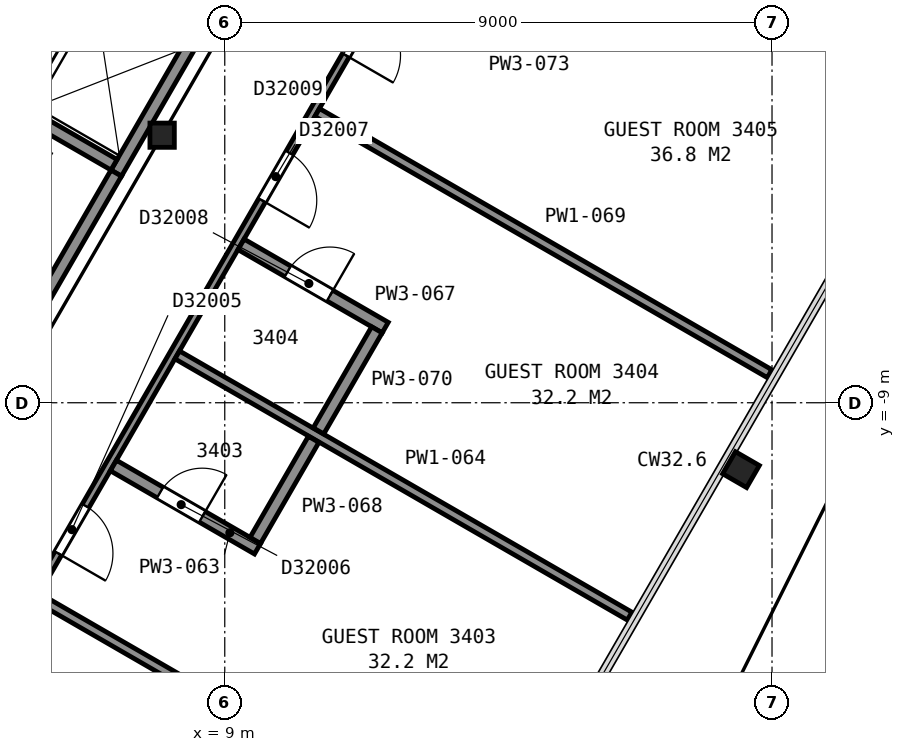
"""IFC4 building model, lengths in metres.
Left out: names, types, materials, properties, quantities, classifications, styles, units other than length and angle.
Written with IfcOpenShell. Run it as: python <this file> out.ifc"""

import sys

from ifc_helpers import new_model, si_unit, direction, frame, frame_2d, origin, origin_2d, place, context, subcontext, project, spatial, rectangle, i_section, extrude, element, fill, save


model = new_model("IFC4")
c1 = context("Model", 3, precision=1e-05, world=origin(), true_north=direction((0.0, 1.0)))
c2 = subcontext(c1, "Body", "Model", "MODEL_VIEW")
j1 = project(units=[si_unit("LENGTHUNIT", "METRE"), si_unit("PLANEANGLEUNIT", "RADIAN")], contexts=[c1])
p1 = place(None, origin())
s1 = spatial("IfcSite", under=j1, at=p1, CompositionType="ELEMENT")
p2 = place(p1, origin())
s2 = spatial("IfcBuilding", under=s1, at=p2, CompositionType="ELEMENT")
p3 = place(p2, frame((0.0, 0.0, 139.6)))
s3 = spatial("IfcBuildingStorey", under=s2, at=p3, CompositionType="ELEMENT", Elevation=139.6)
p4 = place(p3, frame((17.49, -10.1, 0.0), z_axis=(0.0, 0.0, 1.0), x_axis=(-0.5, -0.866025403784, 0.0)))
e1 = element("IfcColumn", 1, at=p4, inside=s3, PredefinedType="COLUMN", context=c2, shape_type="SweptSolid", body=[
    extrude(i_section(OverallWidth=0.419, OverallDepth=0.455, WebThickness=0.042, FlangeThickness=0.068, FilletRadius=0.015, at=origin_2d()), origin(), (0.0, 0.0, 1.0), 2.87),
])
p5 = place(p3, frame((7.97, -4.6, 0.0), z_axis=(0.0, 0.0, 1.0), x_axis=(1.0, 0.0, 0.0)))
e2 = element("IfcColumn", 2, at=p5, inside=s3, PredefinedType="COLUMN", context=c2, shape_type="SweptSolid", body=[
    extrude(i_section(OverallWidth=0.401, OverallDepth=0.399, WebThickness=0.025, FlangeThickness=0.04, FilletRadius=0.015, at=origin_2d()), origin(), (0.0, 0.0, 1.0), 3.56),
])
p6 = place(p3, frame((7.216, -5.222, 0.0), z_axis=(0.0, 0.0, 1.0), x_axis=(0.499990435942, 0.866030925526, 0.0)))
e3 = element("IfcWall", 3, at=p6, inside=s3, PredefinedType="PARTITIONING", context=c2, shape_type="SweptSolid", body=[
    extrude(rectangle(XDim=2.55, YDim=0.2, at=frame_2d((1.275, 0.0))), origin(), (0.0, 0.0, 1.0), 3.6),
])
p7 = place(p3, frame((5.527, -4.247, 0.0), z_axis=(0.0, 0.0, 1.0), x_axis=(0.499938297808, 0.866061024631, 0.0)))
e4 = element("IfcWall", 4, at=p7, inside=s3, PredefinedType="PARTITIONING", context=c2, shape_type="SweptSolid", body=[
    extrude(rectangle(XDim=2.35, YDim=0.2, at=frame_2d((1.175, 0.0))), origin(), (0.0, 0.0, 1.0), 3.6),
])
p8 = place(p7, frame((0.725, 0.0, 0.0)))
e5 = element("IfcOpeningElement", 5, at=p8, cuts=e4, PredefinedType="OPENING", context=c2, shape_type="SweptSolid", body=[
    extrude(rectangle(XDim=1.1, YDim=2.1, at=frame_2d((0.55, 1.05))), frame((0.0, 0.11, 0.0), z_axis=(0.0, -1.0, 0.0), x_axis=(1.0, 0.0, 0.0)), (0.0, 0.0, 1.0), 0.22),
])
p9 = place(p3, frame((7.179, -5.086, 0.0), z_axis=(0.0, 0.0, 1.0), x_axis=(-0.866036909293, 0.499980071345, 0.0)))
e6 = element("IfcWall", 6, at=p9, inside=s3, PredefinedType="PARTITIONING", context=c2, shape_type="SweptSolid", body=[
    extrude(rectangle(XDim=1.75, YDim=0.2, at=frame_2d((0.875, 0.0))), origin(), (0.0, 0.0, 1.0), 3.6),
])
p10 = place(p3, frame((5.906, -7.49, 0.0), z_axis=(0.0, 0.0, 1.0), x_axis=(0.500252727967, 0.865879442048, 0.0)))
e7 = element("IfcWall", 7, at=p10, inside=s3, PredefinedType="PARTITIONING", context=c2, shape_type="SweptSolid", body=[
    extrude(rectangle(XDim=2.617, YDim=0.2, at=frame_2d((1.309, 0.0))), origin(), (0.0, 0.0, 1.0), 3.35),
])
p11 = place(p3, frame((15.962, 5.326, 0.0), z_axis=(0.0, 0.0, 1.0), x_axis=(-0.499992829944, -0.866029543379, 0.0)))
e8 = element("IfcWall", 8, at=p11, inside=s3, PredefinedType="PARTITIONING", context=c2, shape_type="SweptSolid", body=[
    extrude(rectangle(XDim=24.413, YDim=0.125, at=frame_2d((12.207, 0.0))), origin(), (0.0, 0.0, 1.0), 2.262),
])
p12 = place(p11, frame((21.258, 0.0, 0.0)))
e9 = element("IfcOpeningElement", 9, at=p12, cuts=e8, PredefinedType="OPENING", context=c2, shape_type="SweptSolid", body=[
    extrude(rectangle(XDim=0.9, YDim=2.1, at=frame_2d((0.45, 1.05))), frame((0.0, 0.073, 0.0), z_axis=(0.0, -1.0, 0.0), x_axis=(1.0, 0.0, 0.0)), (0.0, 0.0, 1.0), 0.145),
])
p13 = place(p11, frame((18.502, 0.0, 0.0)))
e10 = element("IfcOpeningElement", 10, at=p13, cuts=e8, PredefinedType="OPENING", context=c2, shape_type="SweptSolid", body=[
    extrude(rectangle(XDim=0.9, YDim=2.1, at=frame_2d((0.45, 1.05))), frame((0.0, 0.073, 0.0), z_axis=(0.0, -1.0, 0.0), x_axis=(1.0, 0.0, 0.0)), (0.0, 0.0, 1.0), 0.145),
])
p14 = place(p11, frame((11.799, 0.0, 0.0)))
e11 = element("IfcOpeningElement", 11, at=p14, cuts=e8, PredefinedType="OPENING", context=c2, shape_type="SweptSolid", body=[
    extrude(rectangle(XDim=0.9, YDim=2.1, at=frame_2d((0.45, 1.05))), frame((0.0, 0.073, 0.0), z_axis=(0.0, -1.0, 0.0), x_axis=(1.0, 0.0, 0.0)), (0.0, 0.0, 1.0), 0.145),
])
p15 = place(p11, frame((9.043, 0.0, 0.0)))
e12 = element("IfcOpeningElement", 12, at=p15, cuts=e8, PredefinedType="OPENING", context=c2, shape_type="SweptSolid", body=[
    extrude(rectangle(XDim=0.9, YDim=2.1, at=frame_2d((0.45, 1.05))), frame((0.0, 0.073, 0.0), z_axis=(0.0, -1.0, 0.0), x_axis=(1.0, 0.0, 0.0)), (0.0, 0.0, 1.0), 0.145),
])
p16 = place(p11, frame((1.99, 0.0, 0.0)))
e13 = element("IfcOpeningElement", 13, at=p16, cuts=e8, PredefinedType="OPENING", context=c2, shape_type="SweptSolid", body=[
    extrude(rectangle(XDim=0.9, YDim=2.1, at=frame_2d((0.45, 1.05))), frame((0.0, 0.073, 0.0), z_axis=(0.0, -1.0, 0.0), x_axis=(1.0, 0.0, 0.0)), (0.0, 0.0, 1.0), 0.145),
])
p17 = place(p3, frame((5.916, -12.201, 0.0), z_axis=(0.0, 0.0, 1.0), x_axis=(0.865995804368, -0.50005126419, 0.0)))
e14 = element("IfcWall", 14, at=p17, inside=s3, PredefinedType="PARTITIONING", context=c2, shape_type="SweptSolid", body=[
    extrude(rectangle(XDim=8.591, YDim=0.15, at=frame_2d((4.295, 0.0))), origin(), (0.0, 0.0, 1.0), 2.262),
])
p18 = place(p3, frame((7.168, -10.032, 0.0), z_axis=(0.0, 0.0, 1.0), x_axis=(0.86596722502, -0.50010075504, 0.0)))
e15 = element("IfcWall", 15, at=p18, inside=s3, PredefinedType="PARTITIONING", context=c2, shape_type="SweptSolid", body=[
    extrude(rectangle(XDim=2.737, YDim=0.2, at=frame_2d((1.369, 0.0))), origin(), (0.0, 0.0, 1.0), 2.262),
])
p19 = place(p18, frame((0.887, 0.0, 0.0)))
e16 = element("IfcOpeningElement", 16, at=p19, cuts=e15, PredefinedType="OPENING", context=c2, shape_type="SweptSolid", body=[
    extrude(rectangle(XDim=0.8, YDim=2.1, at=frame_2d((0.4, 1.05))), frame((0.0, 0.11, 0.0), z_axis=(0.0, -1.0, 0.0), x_axis=(1.0, 0.0, 0.0)), (0.0, 0.0, 1.0), 0.22),
])
p20 = place(p3, frame((8.218, -8.213, 0.0), z_axis=(0.0, 0.0, 1.0), x_axis=(0.865997709989, -0.500047963993, 0.0)))
e17 = element("IfcWall", 17, at=p20, inside=s3, PredefinedType="PARTITIONING", context=c2, shape_type="SweptSolid", body=[
    extrude(rectangle(XDim=8.592, YDim=0.15, at=frame_2d((4.296, 0.0))), origin(), (0.0, 0.0, 1.0), 2.262),
])
p21 = place(p3, frame((11.639, -7.764, 0.0), z_axis=(0.0, 0.0, 1.0), x_axis=(-0.866028150195, 0.499995243048, 0.0)))
e18 = element("IfcWall", 18, at=p21, inside=s3, PredefinedType="PARTITIONING", context=c2, shape_type="SweptSolid", body=[
    extrude(rectangle(XDim=2.737, YDim=0.2, at=frame_2d((1.369, 0.0))), origin(), (0.0, 0.0, 1.0), 2.262),
])
p22 = place(p21, frame((1.05, 0.0, 0.0)))
e19 = element("IfcOpeningElement", 19, at=p22, cuts=e18, PredefinedType="OPENING", context=c2, shape_type="SweptSolid", body=[
    extrude(rectangle(XDim=0.8, YDim=2.1, at=frame_2d((0.4, 1.05))), frame((0.0, 0.11, 0.0), z_axis=(0.0, -1.0, 0.0), x_axis=(1.0, 0.0, 0.0)), (0.0, 0.0, 1.0), 0.22),
])
p23 = place(p3, frame((9.502, -11.264, 0.0), z_axis=(0.0, 0.0, 1.0), x_axis=(0.499887618105, 0.86609027778, 0.0)))
e20 = element("IfcWall", 20, at=p23, inside=s3, PredefinedType="PARTITIONING", context=c2, shape_type="SweptSolid", body=[
    extrude(rectangle(XDim=1.919, YDim=0.2, at=frame_2d((0.96, 0.0))), origin(), (0.0, 0.0, 1.0), 2.262),
])
p24 = place(p3, frame((10.52, -4.226, 0.0), z_axis=(0.0, 0.0, 1.0), x_axis=(0.866002910178, -0.500038958046, 0.0)))
e21 = element("IfcWall", 21, at=p24, inside=s3, PredefinedType="PARTITIONING", context=c2, shape_type="SweptSolid", body=[
    extrude(rectangle(XDim=8.591, YDim=0.15, at=frame_2d((4.295, 0.0))), origin(), (0.0, 0.0, 1.0), 2.262),
])
p25 = place(p3, frame((10.542, -9.463, 0.0), z_axis=(0.0, 0.0, 1.0), x_axis=(0.500214044309, 0.865901789971, 0.0)))
e22 = element("IfcWall", 22, at=p25, inside=s3, PredefinedType="PARTITIONING", context=c2, shape_type="SweptSolid", body=[
    extrude(rectangle(XDim=1.92, YDim=0.2, at=frame_2d((0.96, 0.0))), origin(), (0.0, 0.0, 1.0), 2.262),
])
p26 = place(p3, frame((13.122, 0.281, 0.0), z_axis=(0.0, 0.0, 1.0), x_axis=(0.866029425019, -0.499993034952, 0.0)))
e23 = element("IfcWall", 23, at=p26, inside=s3, PredefinedType="PARTITIONING", context=c2, shape_type="SweptSolid", body=[
    extrude(rectangle(XDim=8.591, YDim=0.15, at=frame_2d((4.296, 0.0))), origin(), (0.0, 0.0, 1.0), 2.262),
])
p27 = place(p8, origin())
e24 = element("IfcDoor", 24, at=p27, inside=s3, OperationType="SLIDING_TO_LEFT", PredefinedType="DOOR", context=c2, shape_type="SweptSolid", body=[
    extrude(rectangle(XDim=1.1, YDim=2.1, at=frame_2d((0.55, 1.05))), frame((0.0, 0.025, 0.0), z_axis=(0.0, -1.0, 0.0), x_axis=(1.0, 0.0, 0.0)), (0.0, 0.0, 1.0), 0.05),
])
fill(e5, e24)
p28 = place(p13, origin())
e25 = element("IfcDoor", 25, at=p28, inside=s3, OperationType="SINGLE_SWING_RIGHT", PredefinedType="DOOR", context=c2, shape_type="SweptSolid", body=[
    extrude(rectangle(XDim=0.9, YDim=2.1, at=frame_2d((0.45, 1.05))), frame((0.0, 0.025, 0.0), z_axis=(0.0, -1.0, 0.0), x_axis=(1.0, 0.0, 0.0)), (0.0, 0.0, 1.0), 0.05),
])
fill(e10, e25)
p29 = place(p14, origin())
e26 = element("IfcDoor", 26, at=p29, inside=s3, OperationType="SINGLE_SWING_RIGHT", PredefinedType="DOOR", context=c2, shape_type="SweptSolid", body=[
    extrude(rectangle(XDim=0.9, YDim=2.1, at=frame_2d((0.45, 1.05))), frame((0.0, 0.025, 0.0), z_axis=(0.0, -1.0, 0.0), x_axis=(1.0, 0.0, 0.0)), (0.0, 0.0, 1.0), 0.05),
])
fill(e11, e26)
p30 = place(p15, origin())
e27 = element("IfcDoor", 27, at=p30, inside=s3, OperationType="SINGLE_SWING_RIGHT", PredefinedType="DOOR", context=c2, shape_type="SweptSolid", body=[
    extrude(rectangle(XDim=0.9, YDim=2.1, at=frame_2d((0.45, 1.05))), frame((0.0, 0.025, 0.0), z_axis=(0.0, -1.0, 0.0), x_axis=(1.0, 0.0, 0.0)), (0.0, 0.0, 1.0), 0.05),
])
fill(e12, e27)
p31 = place(p19, origin())
e28 = element("IfcDoor", 28, at=p31, inside=s3, OperationType="SINGLE_SWING_RIGHT", PredefinedType="DOOR", context=c2, shape_type="SweptSolid", body=[
    extrude(rectangle(XDim=0.8, YDim=2.1, at=frame_2d((0.4, 1.05))), frame((0.0, 0.025, 0.0), z_axis=(0.0, -1.0, 0.0), x_axis=(1.0, 0.0, 0.0)), (0.0, 0.0, 1.0), 0.05),
])
fill(e16, e28)
p32 = place(p22, origin())
e29 = element("IfcDoor", 29, at=p32, inside=s3, OperationType="SINGLE_SWING_LEFT", PredefinedType="DOOR", context=c2, shape_type="SweptSolid", body=[
    extrude(rectangle(XDim=0.8, YDim=2.1, at=frame_2d((0.4, 1.05))), frame((0.0, 0.025, 0.0), z_axis=(0.0, -1.0, 0.0), x_axis=(1.0, 0.0, 0.0)), (0.0, 0.0, 1.0), 0.05),
])
fill(e19, e29)
save(model, sys.argv[1])
